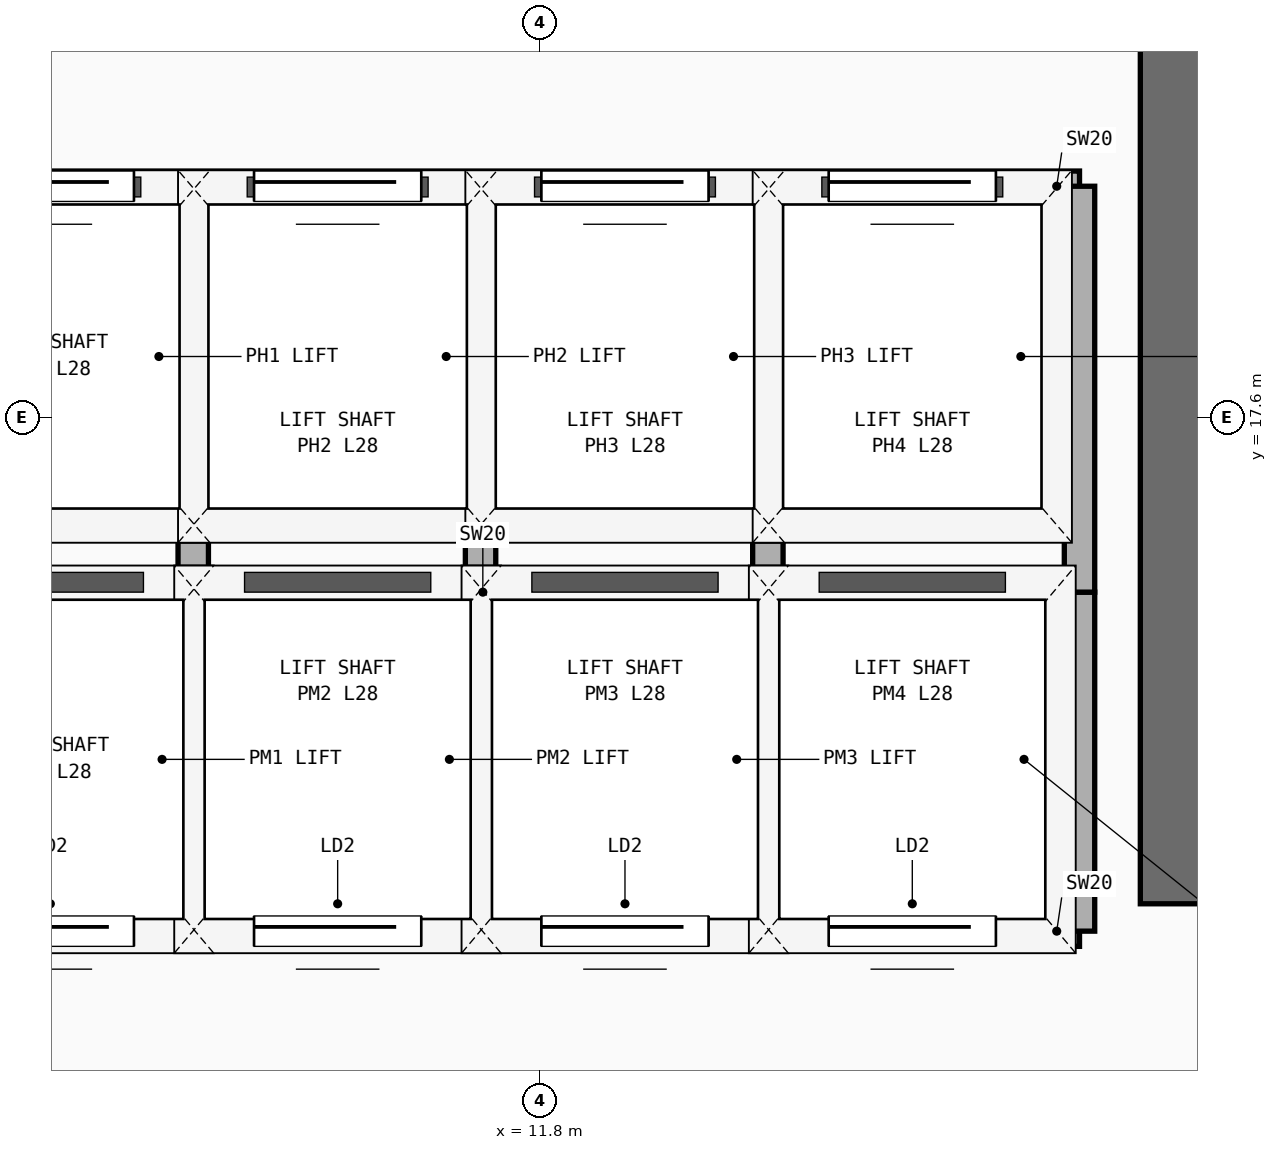
"""IFC4 building model, lengths in metres.
Left out: names, types, materials, properties, quantities, classifications, styles, units other than length and angle.
Written with IfcOpenShell. Run it as: python <this file> out.ifc"""

import sys

from ifc_helpers import new_model, si_unit, direction, frame, frame_2d, origin, place, context, subcontext, project, spatial, rectangle, extrude, element, fill, save


model = new_model("IFC4")
c1 = context("Model", 3, precision=1e-05, world=origin(), true_north=direction((0.0, 1.0)))
c2 = subcontext(c1, "Body", "Model", "MODEL_VIEW")
j1 = project(units=[si_unit("LENGTHUNIT", "METRE"), si_unit("PLANEANGLEUNIT", "RADIAN")], contexts=[c1])
p1 = place(None, origin())
s1 = spatial("IfcSite", under=j1, at=p1, CompositionType="ELEMENT")
p2 = place(p1, origin())
s2 = spatial("IfcBuilding", under=s1, at=p2, CompositionType="ELEMENT")
p3 = place(p2, frame((0.0, 0.0, 110.7)))
s3 = spatial("IfcBuildingStorey", under=s2, at=p3, CompositionType="ELEMENT", Elevation=110.7)
p4 = place(p3, frame((16.075, 14.4, 0.0), z_axis=(0.0, 0.0, 1.0), x_axis=(0.0, 1.0, 0.0)))
e1 = element("IfcWall", 1, at=p4, inside=s3, PredefinedType="SHEAR", context=c2, shape_type="SweptSolid", body=[
    extrude(rectangle(XDim=9.1, YDim=0.65, at=frame_2d((4.55, 0.0))), origin(), (0.0, 0.0, 1.0), 3.54),
])
p5 = place(p3, frame((7.5, 14.22, 0.0), z_axis=(0.0, 0.0, 1.0), x_axis=(1.0, 0.0, 0.0)))
e2 = element("IfcWall", 2, at=p5, inside=s3, PredefinedType="PARTITIONING", context=c2, shape_type="SweptSolid", body=[
    extrude(rectangle(XDim=7.85, YDim=0.2, at=frame_2d((3.925, 0.0))), origin(), (0.0, 0.0, 1.0), 3.54),
])
p6 = place(p5, frame((0.53, 0.0, 0.0)))
e3 = element("IfcOpeningElement", 3, at=p6, cuts=e2, PredefinedType="OPENING", context=c2, shape_type="SweptSolid", body=[
    extrude(rectangle(XDim=1.1, YDim=2.2, at=frame_2d((0.55, 1.1))), frame((0.0, 0.11, 0.0), z_axis=(0.0, -1.0, 0.0), x_axis=(1.0, 0.0, 0.0)), (0.0, 0.0, 1.0), 0.22),
])
p7 = place(p5, frame((2.42, 0.0, 0.0)))
e4 = element("IfcOpeningElement", 4, at=p7, cuts=e2, PredefinedType="OPENING", context=c2, shape_type="SweptSolid", body=[
    extrude(rectangle(XDim=1.1, YDim=2.2, at=frame_2d((0.55, 1.1))), frame((0.0, 0.11, 0.0), z_axis=(0.0, -1.0, 0.0), x_axis=(1.0, 0.0, 0.0)), (0.0, 0.0, 1.0), 0.22),
])
p8 = place(p5, frame((4.31, 0.0, 0.0)))
e5 = element("IfcOpeningElement", 5, at=p8, cuts=e2, PredefinedType="OPENING", context=c2, shape_type="SweptSolid", body=[
    extrude(rectangle(XDim=1.1, YDim=2.2, at=frame_2d((0.55, 1.1))), frame((0.0, 0.11, 0.0), z_axis=(0.0, -1.0, 0.0), x_axis=(1.0, 0.0, 0.0)), (0.0, 0.0, 1.0), 0.22),
])
p9 = place(p5, frame((6.2, 0.0, 0.0)))
e6 = element("IfcOpeningElement", 6, at=p9, cuts=e2, PredefinedType="OPENING", context=c2, shape_type="SweptSolid", body=[
    extrude(rectangle(XDim=1.1, YDim=2.2, at=frame_2d((0.55, 1.1))), frame((0.0, 0.11, 0.0), z_axis=(0.0, -1.0, 0.0), x_axis=(1.0, 0.0, 0.0)), (0.0, 0.0, 1.0), 0.22),
])
p10 = place(p3, frame((7.5, 16.45, 0.0), z_axis=(0.0, 0.0, 1.0), x_axis=(1.0, 0.0, 0.0)))
e7 = element("IfcWall", 7, at=p10, inside=s3, PredefinedType="PARTITIONING", context=c2, shape_type="SweptSolid", body=[
    extrude(rectangle(XDim=7.85, YDim=0.2, at=frame_2d((3.925, 0.0))), origin(), (0.0, 0.0, 1.0), 3.54),
])
for number, where, z_axis, x_axis in (
    (8, (15.35, 14.22, 0.0), (0.0, 0.0, 1.0), (0.0, 1.0, 0.0)),
    (9, (9.52, 14.22, 0.0), (0.0, 0.0, 1.0), (0.0, 1.0, 0.0)),
    (10, (11.41, 14.22, 0.0), (0.0, 0.0, 1.0), (0.0, 1.0, 0.0)),
    (11, (13.3, 14.22, 0.0), (0.0, 0.0, 1.0), (0.0, 1.0, 0.0)),
):
    element("IfcWall", number, at=place(p3, frame(where, z_axis=z_axis, x_axis=x_axis)), inside=s3, PredefinedType="PARTITIONING", context=c2, shape_type="SweptSolid", body=[
        extrude(rectangle(XDim=2.23, YDim=0.2, at=frame_2d((1.115, 0.0))), origin(), (0.0, 0.0, 1.0), 3.54),
    ])
p11 = place(p3, frame((7.5, 19.12, 0.0), z_axis=(0.0, 0.0, 1.0), x_axis=(1.0, 0.0, 0.0)))
e12 = element("IfcWall", 12, at=p11, inside=s3, PredefinedType="PARTITIONING", context=c2, shape_type="SweptSolid", body=[
    extrude(rectangle(XDim=7.85, YDim=0.2, at=frame_2d((3.925, 0.0))), origin(), (0.0, 0.0, 1.0), 3.54),
])
p12 = place(p11, frame((0.53, 0.0, 0.0)))
e13 = element("IfcOpeningElement", 13, at=p12, cuts=e12, PredefinedType="OPENING", context=c2, shape_type="SweptSolid", body=[
    extrude(rectangle(XDim=1.1, YDim=2.2, at=frame_2d((0.55, 1.1))), frame((0.0, 0.11, 0.0), z_axis=(0.0, -1.0, 0.0), x_axis=(1.0, 0.0, 0.0)), (0.0, 0.0, 1.0), 0.22),
])
p13 = place(p11, frame((2.42, 0.0, 0.0)))
e14 = element("IfcOpeningElement", 14, at=p13, cuts=e12, PredefinedType="OPENING", context=c2, shape_type="SweptSolid", body=[
    extrude(rectangle(XDim=1.1, YDim=2.2, at=frame_2d((0.55, 1.1))), frame((0.0, 0.11, 0.0), z_axis=(0.0, -1.0, 0.0), x_axis=(1.0, 0.0, 0.0)), (0.0, 0.0, 1.0), 0.22),
])
p14 = place(p11, frame((4.31, 0.0, 0.0)))
e15 = element("IfcOpeningElement", 15, at=p14, cuts=e12, PredefinedType="OPENING", context=c2, shape_type="SweptSolid", body=[
    extrude(rectangle(XDim=1.1, YDim=2.2, at=frame_2d((0.55, 1.1))), frame((0.0, 0.11, 0.0), z_axis=(0.0, -1.0, 0.0), x_axis=(1.0, 0.0, 0.0)), (0.0, 0.0, 1.0), 0.22),
])
p15 = place(p11, frame((6.2, 0.0, 0.0)))
e16 = element("IfcOpeningElement", 16, at=p15, cuts=e12, PredefinedType="OPENING", context=c2, shape_type="SweptSolid", body=[
    extrude(rectangle(XDim=1.1, YDim=2.2, at=frame_2d((0.55, 1.1))), frame((0.0, 0.11, 0.0), z_axis=(0.0, -1.0, 0.0), x_axis=(1.0, 0.0, 0.0)), (0.0, 0.0, 1.0), 0.22),
])
for number, where, z_axis, x_axis in (
    (17, (15.35, 16.45, 0.0), (0.0, 0.0, 1.0), (0.0, 1.0, 0.0)),
    (18, (9.52, 16.45, 0.0), (0.0, 0.0, 1.0), (0.0, 1.0, 0.0)),
    (19, (11.41, 16.45, 0.0), (0.0, 0.0, 1.0), (0.0, 1.0, 0.0)),
    (20, (13.3, 16.45, 0.0), (0.0, 0.0, 1.0), (0.0, 1.0, 0.0)),
):
    element("IfcWall", number, at=place(p3, frame(where, z_axis=z_axis, x_axis=x_axis)), inside=s3, PredefinedType="PARTITIONING", context=c2, shape_type="SweptSolid", body=[
        extrude(rectangle(XDim=2.67, YDim=0.2, at=frame_2d((1.335, 0.0))), origin(), (0.0, 0.0, 1.0), 3.54),
    ])
p16 = place(p6, frame((1.1, 0.0, 0.0), z_axis=(0.0, 0.0, 1.0), x_axis=(-1.0, 0.0, 0.0)))
e21 = element("IfcDoor", 21, at=p16, inside=s3, OperationType="SLIDING_TO_LEFT", PredefinedType="DOOR", context=c2, shape_type="SweptSolid", body=[
    extrude(rectangle(XDim=1.1, YDim=2.2, at=frame_2d((0.55, 1.1))), frame((0.0, 0.025, 0.0), z_axis=(0.0, -1.0, 0.0), x_axis=(1.0, 0.0, 0.0)), (0.0, 0.0, 1.0), 0.05),
])
fill(e3, e21)
p17 = place(p7, frame((1.1, 0.0, 0.0), z_axis=(0.0, 0.0, 1.0), x_axis=(-1.0, 0.0, 0.0)))
e22 = element("IfcDoor", 22, at=p17, inside=s3, OperationType="SLIDING_TO_LEFT", PredefinedType="DOOR", context=c2, shape_type="SweptSolid", body=[
    extrude(rectangle(XDim=1.1, YDim=2.2, at=frame_2d((0.55, 1.1))), frame((0.0, 0.025, 0.0), z_axis=(0.0, -1.0, 0.0), x_axis=(1.0, 0.0, 0.0)), (0.0, 0.0, 1.0), 0.05),
])
fill(e4, e22)
p18 = place(p8, frame((1.1, 0.0, 0.0), z_axis=(0.0, 0.0, 1.0), x_axis=(-1.0, 0.0, 0.0)))
e23 = element("IfcDoor", 23, at=p18, inside=s3, OperationType="SLIDING_TO_LEFT", PredefinedType="DOOR", context=c2, shape_type="SweptSolid", body=[
    extrude(rectangle(XDim=1.1, YDim=2.2, at=frame_2d((0.55, 1.1))), frame((0.0, 0.025, 0.0), z_axis=(0.0, -1.0, 0.0), x_axis=(1.0, 0.0, 0.0)), (0.0, 0.0, 1.0), 0.05),
])
fill(e5, e23)
p19 = place(p9, frame((1.1, 0.0, 0.0), z_axis=(0.0, 0.0, 1.0), x_axis=(-1.0, 0.0, 0.0)))
e24 = element("IfcDoor", 24, at=p19, inside=s3, OperationType="SLIDING_TO_LEFT", PredefinedType="DOOR", context=c2, shape_type="SweptSolid", body=[
    extrude(rectangle(XDim=1.1, YDim=2.2, at=frame_2d((0.55, 1.1))), frame((0.0, 0.025, 0.0), z_axis=(0.0, -1.0, 0.0), x_axis=(1.0, 0.0, 0.0)), (0.0, 0.0, 1.0), 0.05),
])
fill(e6, e24)
p20 = place(p12, origin())
e25 = element("IfcDoor", 25, at=p20, inside=s3, OperationType="SLIDING_TO_LEFT", PredefinedType="DOOR", context=c2, shape_type="SweptSolid", body=[
    extrude(rectangle(XDim=1.1, YDim=2.2, at=frame_2d((0.55, 1.1))), frame((0.0, 0.025, 0.0), z_axis=(0.0, -1.0, 0.0), x_axis=(1.0, 0.0, 0.0)), (0.0, 0.0, 1.0), 0.05),
])
fill(e13, e25)
p21 = place(p13, origin())
e26 = element("IfcDoor", 26, at=p21, inside=s3, OperationType="SLIDING_TO_LEFT", PredefinedType="DOOR", context=c2, shape_type="SweptSolid", body=[
    extrude(rectangle(XDim=1.1, YDim=2.2, at=frame_2d((0.55, 1.1))), frame((0.0, 0.025, 0.0), z_axis=(0.0, -1.0, 0.0), x_axis=(1.0, 0.0, 0.0)), (0.0, 0.0, 1.0), 0.05),
])
fill(e14, e26)
p22 = place(p14, origin())
e27 = element("IfcDoor", 27, at=p22, inside=s3, OperationType="SLIDING_TO_LEFT", PredefinedType="DOOR", context=c2, shape_type="SweptSolid", body=[
    extrude(rectangle(XDim=1.1, YDim=2.2, at=frame_2d((0.55, 1.1))), frame((0.0, 0.025, 0.0), z_axis=(0.0, -1.0, 0.0), x_axis=(1.0, 0.0, 0.0)), (0.0, 0.0, 1.0), 0.05),
])
fill(e15, e27)
p23 = place(p15, origin())
e28 = element("IfcDoor", 28, at=p23, inside=s3, OperationType="SLIDING_TO_LEFT", PredefinedType="DOOR", context=c2, shape_type="SweptSolid", body=[
    extrude(rectangle(XDim=1.1, YDim=2.2, at=frame_2d((0.55, 1.1))), frame((0.0, 0.025, 0.0), z_axis=(0.0, -1.0, 0.0), x_axis=(1.0, 0.0, 0.0)), (0.0, 0.0, 1.0), 0.05),
])
fill(e16, e28)
save(model, sys.argv[1])
